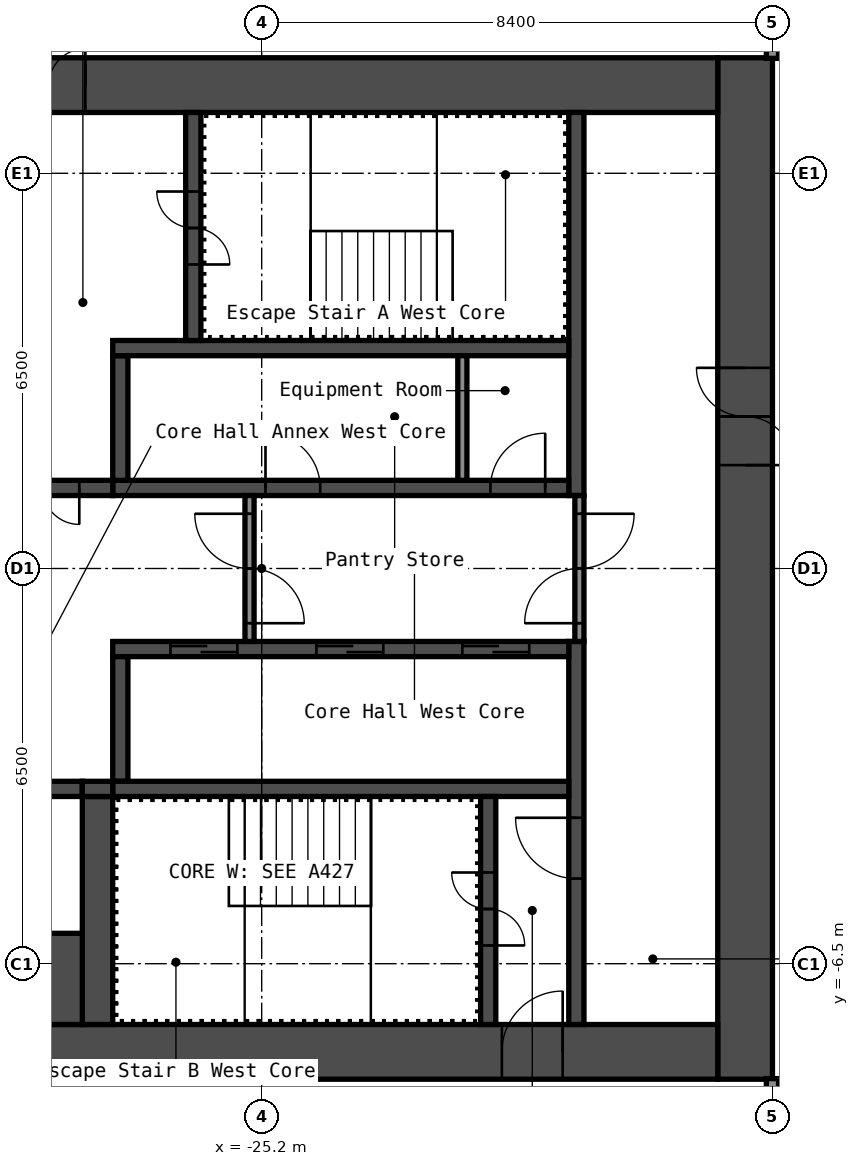
"""IFC4 building model, lengths in metres.
Left out: names, types, materials, properties, quantities, classifications, styles, units other than length and angle.
Written with IfcOpenShell. Run it as: python <this file> out.ifc"""

import sys

from ifc_helpers import new_model, si_unit, direction, frame, frame_2d, origin, place, context, subcontext, project, spatial, rectangle, extrude, element, fill, save


model = new_model("IFC4")
c1 = context("Model", 3, precision=1e-05, world=origin(), true_north=direction((0.0, 1.0)))
c2 = subcontext(c1, "Body", "Model", "MODEL_VIEW")
j1 = project(units=[si_unit("LENGTHUNIT", "METRE"), si_unit("PLANEANGLEUNIT", "RADIAN")], contexts=[c1])
p1 = place(None, origin())
s1 = spatial("IfcSite", under=j1, at=p1, CompositionType="ELEMENT")
p2 = place(p1, origin())
s2 = spatial("IfcBuilding", under=s1, at=p2, CompositionType="ELEMENT")
p3 = place(p2, frame((0.0, 0.0, 180.2)))
s3 = spatial("IfcBuildingStorey", under=s2, at=p3, CompositionType="ELEMENT", Elevation=180.2)
p4 = place(p3, frame((-17.25, -8.4, 0.0), z_axis=(0.0, 0.0, 1.0), x_axis=(0.0, 1.0, 0.0)))
e1 = element("IfcWall", 1, at=p4, inside=s3, PredefinedType="SHEAR", context=c2, shape_type="SweptSolid", body=[
    extrude(rectangle(XDim=16.8, YDim=0.9, at=frame_2d((8.4, 0.0))), origin(), (0.0, 0.0, 1.0), 5.95),
])
p5 = place(p4, frame((10.1, 0.0, 0.0)))
e2 = element("IfcOpeningElement", 2, at=p5, cuts=e1, PredefinedType="OPENING", context=c2, shape_type="SweptSolid", body=[
    extrude(rectangle(XDim=1.6, YDim=2.1, at=frame_2d((0.8, 1.05))), frame((0.0, 0.46, 0.0), z_axis=(0.0, -1.0, 0.0), x_axis=(1.0, 0.0, 0.0)), (0.0, 0.0, 1.0), 0.92),
])
p6 = place(p3, frame((-32.7, 7.95, 0.0), z_axis=(0.0, 0.0, 1.0), x_axis=(1.0, 0.0, 0.0)))
e3 = element("IfcWall", 3, at=p6, inside=s3, PredefinedType="SHEAR", context=c2, shape_type="SweptSolid", body=[
    extrude(rectangle(XDim=15.0, YDim=0.9, at=frame_2d((7.5, 0.0))), origin(), (0.0, 0.0, 1.0), 5.95),
])
p7 = place(p6, frame((3.4, 0.0, 0.0)))
e4 = element("IfcOpeningElement", 4, at=p7, cuts=e3, PredefinedType="OPENING", context=c2, shape_type="SweptSolid", body=[
    extrude(rectangle(XDim=1.2, YDim=2.1, at=frame_2d((0.6, 1.05))), frame((0.0, 0.46, 0.0), z_axis=(0.0, -1.0, 0.0), x_axis=(1.0, 0.0, 0.0)), (0.0, 0.0, 1.0), 0.92),
])
p8 = place(p6, frame((0.75, 0.0, 0.0)))
e5 = element("IfcOpeningElement", 5, at=p8, cuts=e3, PredefinedType="OPENING", context=c2, shape_type="SweptSolid", body=[
    extrude(rectangle(XDim=0.9, YDim=2.1, at=frame_2d((0.45, 1.05))), frame((0.0, 0.46, 0.0), z_axis=(0.0, -1.0, 0.0), x_axis=(1.0, 0.0, 0.0)), (0.0, 0.0, 1.0), 0.92),
])
p9 = place(p3, frame((-32.7, -7.95, 0.0), z_axis=(0.0, 0.0, 1.0), x_axis=(1.0, 0.0, 0.0)))
e6 = element("IfcWall", 6, at=p9, inside=s3, PredefinedType="SHEAR", context=c2, shape_type="SweptSolid", body=[
    extrude(rectangle(XDim=15.0, YDim=0.9, at=frame_2d((7.5, 0.0))), origin(), (0.0, 0.0, 1.0), 5.95),
])
p10 = place(p9, frame((11.45, 0.0, 0.0)))
e7 = element("IfcOpeningElement", 7, at=p10, cuts=e6, PredefinedType="OPENING", context=c2, shape_type="SweptSolid", body=[
    extrude(rectangle(XDim=1.0, YDim=2.1, at=frame_2d((0.5, 1.05))), frame((0.0, 0.46, 0.0), z_axis=(0.0, -1.0, 0.0), x_axis=(1.0, 0.0, 0.0)), (0.0, 0.0, 1.0), 0.92),
])
p11 = place(p3, frame((-20.025, 1.2, 0.0), z_axis=(0.0, 0.0, 1.0), x_axis=(0.0, 1.0, 0.0)))
e8 = element("IfcWall", 8, at=p11, inside=s3, PredefinedType="SHEAR", context=c2, shape_type="SweptSolid", body=[
    extrude(rectangle(XDim=6.3, YDim=0.25, at=frame_2d((3.15, 0.0))), origin(), (0.0, 0.0, 1.0), 5.95),
])
p12 = place(p3, frame((-20.025, -7.5, 0.0), z_axis=(0.0, 0.0, 1.0), x_axis=(0.0, 1.0, 0.0)))
e9 = element("IfcWall", 9, at=p12, inside=s3, PredefinedType="SHEAR", context=c2, shape_type="SweptSolid", body=[
    extrude(rectangle(XDim=6.3, YDim=0.25, at=frame_2d((3.15, 0.0))), origin(), (0.0, 0.0, 1.0), 5.95),
])
p13 = place(p12, frame((2.4, 0.0, 0.0)))
e10 = element("IfcOpeningElement", 10, at=p13, cuts=e9, PredefinedType="OPENING", context=c2, shape_type="SweptSolid", body=[
    extrude(rectangle(XDim=1.0, YDim=2.1, at=frame_2d((0.5, 1.05))), frame((0.0, 0.135, 0.0), z_axis=(0.0, -1.0, 0.0), x_axis=(1.0, 0.0, 0.0)), (0.0, 0.0, 1.0), 0.27),
])
p14 = place(p3, frame((-27.65, 1.325, 0.0), z_axis=(0.0, 0.0, 1.0), x_axis=(1.0, 0.0, 0.0)))
e11 = element("IfcWall", 11, at=p14, inside=s3, PredefinedType="SHEAR", context=c2, shape_type="SweptSolid", body=[
    extrude(rectangle(XDim=7.5, YDim=0.25, at=frame_2d((3.75, 0.0))), origin(), (0.0, 0.0, 1.0), 5.95),
])
p15 = place(p14, frame((6.212, 0.0, 0.0)))
e12 = element("IfcOpeningElement", 12, at=p15, cuts=e11, PredefinedType="OPENING", context=c2, shape_type="SweptSolid", body=[
    extrude(rectangle(XDim=0.9, YDim=2.1, at=frame_2d((0.45, 1.05))), frame((0.0, 0.135, 0.0), z_axis=(0.0, -1.0, 0.0), x_axis=(1.0, 0.0, 0.0)), (0.0, 0.0, 1.0), 0.27),
])
p16 = place(p14, frame((2.512, 0.0, 0.0)))
e13 = element("IfcOpeningElement", 13, at=p16, cuts=e11, PredefinedType="OPENING", context=c2, shape_type="SweptSolid", body=[
    extrude(rectangle(XDim=0.9, YDim=2.1, at=frame_2d((0.45, 1.05))), frame((0.0, 0.135, 0.0), z_axis=(0.0, -1.0, 0.0), x_axis=(1.0, 0.0, 0.0)), (0.0, 0.0, 1.0), 0.27),
])
p17 = place(p3, frame((-27.525, 1.45, 0.0), z_axis=(0.0, 0.0, 1.0), x_axis=(0.0, 1.0, 0.0)))
e14 = element("IfcWall", 14, at=p17, inside=s3, PredefinedType="SHEAR", context=c2, shape_type="SweptSolid", body=[
    extrude(rectangle(XDim=2.05, YDim=0.25, at=frame_2d((1.025, 0.0))), origin(), (0.0, 0.0, 1.0), 5.95),
])
p18 = place(p3, frame((-27.65, 3.625, 0.0), z_axis=(0.0, 0.0, 1.0), x_axis=(1.0, 0.0, 0.0)))
e15 = element("IfcWall", 15, at=p18, inside=s3, PredefinedType="SHEAR", context=c2, shape_type="SweptSolid", body=[
    extrude(rectangle(XDim=7.5, YDim=0.25, at=frame_2d((3.75, 0.0))), origin(), (0.0, 0.0, 1.0), 5.95),
])
p19 = place(p3, frame((-26.325, 3.75, 0.0), z_axis=(0.0, 0.0, 1.0), x_axis=(0.0, 1.0, 0.0)))
e16 = element("IfcWall", 16, at=p19, inside=s3, PredefinedType="SHEAR", context=c2, shape_type="SweptSolid", body=[
    extrude(rectangle(XDim=3.75, YDim=0.25, at=frame_2d((1.875, 0.0))), origin(), (0.0, 0.0, 1.0), 5.95),
])
p20 = place(p19, frame((1.25, 0.0, 0.0)))
e17 = element("IfcOpeningElement", 17, at=p20, cuts=e16, PredefinedType="OPENING", context=c2, shape_type="SweptSolid", body=[
    extrude(rectangle(XDim=1.2, YDim=2.1, at=frame_2d((0.6, 1.05))), frame((0.0, 0.135, 0.0), z_axis=(0.0, -1.0, 0.0), x_axis=(1.0, 0.0, 0.0)), (0.0, 0.0, 1.0), 0.27),
])
p21 = place(p3, frame((-32.7, 1.325, 0.0), z_axis=(0.0, 0.0, 1.0), x_axis=(1.0, 0.0, 0.0)))
e18 = element("IfcWall", 18, at=p21, inside=s3, PredefinedType="SHEAR", context=c2, shape_type="SweptSolid", body=[
    extrude(rectangle(XDim=5.05, YDim=0.25, at=frame_2d((2.525, 0.0))), origin(), (0.0, 0.0, 1.0), 5.95),
])
p22 = place(p21, frame((3.3, 0.0, 0.0)))
e19 = element("IfcOpeningElement", 19, at=p22, cuts=e18, PredefinedType="OPENING", context=c2, shape_type="SweptSolid", body=[
    extrude(rectangle(XDim=1.2, YDim=2.1, at=frame_2d((0.6, 1.05))), frame((0.0, 0.135, 0.0), z_axis=(0.0, -1.0, 0.0), x_axis=(1.0, 0.0, 0.0)), (0.0, 0.0, 1.0), 0.27),
])
p23 = place(p3, frame((-27.65, -1.325, 0.0), z_axis=(0.0, 0.0, 1.0), x_axis=(1.0, 0.0, 0.0)))
e20 = element("IfcWall", 20, at=p23, inside=s3, PredefinedType="SHEAR", context=c2, shape_type="SweptSolid", body=[
    extrude(rectangle(XDim=7.5, YDim=0.25, at=frame_2d((3.75, 0.0))), origin(), (0.0, 0.0, 1.0), 5.95),
])
p24 = place(p23, frame((5.75, 0.0, 0.0)))
e21 = element("IfcOpeningElement", 21, at=p24, cuts=e20, PredefinedType="OPENING", context=c2, shape_type="SweptSolid", body=[
    extrude(rectangle(XDim=1.1, YDim=2.1, at=frame_2d((0.55, 1.05))), frame((0.0, 0.135, 0.0), z_axis=(0.0, -1.0, 0.0), x_axis=(1.0, 0.0, 0.0)), (0.0, 0.0, 1.0), 0.27),
])
p25 = place(p23, frame((3.35, 0.0, 0.0)))
e22 = element("IfcOpeningElement", 22, at=p25, cuts=e20, PredefinedType="OPENING", context=c2, shape_type="SweptSolid", body=[
    extrude(rectangle(XDim=1.1, YDim=2.1, at=frame_2d((0.55, 1.05))), frame((0.0, 0.135, 0.0), z_axis=(0.0, -1.0, 0.0), x_axis=(1.0, 0.0, 0.0)), (0.0, 0.0, 1.0), 0.27),
])
p26 = place(p23, frame((0.95, 0.0, 0.0)))
e23 = element("IfcOpeningElement", 23, at=p26, cuts=e20, PredefinedType="OPENING", context=c2, shape_type="SweptSolid", body=[
    extrude(rectangle(XDim=1.1, YDim=2.1, at=frame_2d((0.55, 1.05))), frame((0.0, 0.135, 0.0), z_axis=(0.0, -1.0, 0.0), x_axis=(1.0, 0.0, 0.0)), (0.0, 0.0, 1.0), 0.27),
])
p27 = place(p3, frame((-27.525, -3.5, 0.0), z_axis=(0.0, 0.0, 1.0), x_axis=(0.0, 1.0, 0.0)))
e24 = element("IfcWall", 24, at=p27, inside=s3, PredefinedType="SHEAR", context=c2, shape_type="SweptSolid", body=[
    extrude(rectangle(XDim=2.05, YDim=0.25, at=frame_2d((1.025, 0.0))), origin(), (0.0, 0.0, 1.0), 5.95),
])
p28 = place(p3, frame((-27.65, -3.625, 0.0), z_axis=(0.0, 0.0, 1.0), x_axis=(1.0, 0.0, 0.0)))
e25 = element("IfcWall", 25, at=p28, inside=s3, PredefinedType="SHEAR", context=c2, shape_type="SweptSolid", body=[
    extrude(rectangle(XDim=7.5, YDim=0.25, at=frame_2d((3.75, 0.0))), origin(), (0.0, 0.0, 1.0), 5.95),
])
p29 = place(p3, frame((-21.475, -7.5, 0.0), z_axis=(0.0, 0.0, 1.0), x_axis=(0.0, 1.0, 0.0)))
e26 = element("IfcWall", 26, at=p29, inside=s3, PredefinedType="SHEAR", context=c2, shape_type="SweptSolid", body=[
    extrude(rectangle(XDim=3.75, YDim=0.25, at=frame_2d((1.875, 0.0))), origin(), (0.0, 0.0, 1.0), 5.95),
])
p30 = place(p29, frame((1.3, 0.0, 0.0)))
e27 = element("IfcOpeningElement", 27, at=p30, cuts=e26, PredefinedType="OPENING", context=c2, shape_type="SweptSolid", body=[
    extrude(rectangle(XDim=1.2, YDim=2.1, at=frame_2d((0.6, 1.05))), frame((0.0, 0.135, 0.0), z_axis=(0.0, -1.0, 0.0), x_axis=(1.0, 0.0, 0.0)), (0.0, 0.0, 1.0), 0.27),
])
p31 = place(p3, frame((-27.9, -7.5, 0.0), z_axis=(0.0, 0.0, 1.0), x_axis=(0.0, 1.0, 0.0)))
e28 = element("IfcWall", 28, at=p31, inside=s3, PredefinedType="SHEAR", context=c2, shape_type="SweptSolid", body=[
    extrude(rectangle(XDim=3.75, YDim=0.5, at=frame_2d((1.875, 0.0))), origin(), (0.0, 0.0, 1.0), 5.95),
])
p32 = place(p3, frame((-32.7, -3.625, 0.0), z_axis=(0.0, 0.0, 1.0), x_axis=(1.0, 0.0, 0.0)))
e29 = element("IfcWall", 29, at=p32, inside=s3, PredefinedType="SHEAR", context=c2, shape_type="SweptSolid", body=[
    extrude(rectangle(XDim=4.55, YDim=0.25, at=frame_2d((2.275, 0.0))), origin(), (0.0, 0.0, 1.0), 5.95),
])
p33 = place(p32, frame((2.85, 0.0, 0.0)))
e30 = element("IfcOpeningElement", 30, at=p33, cuts=e29, PredefinedType="OPENING", context=c2, shape_type="SweptSolid", body=[
    extrude(rectangle(XDim=1.1, YDim=2.1, at=frame_2d((0.55, 1.05))), frame((0.0, 0.135, 0.0), z_axis=(0.0, -1.0, 0.0), x_axis=(1.0, 0.0, 0.0)), (0.0, 0.0, 1.0), 0.27),
])
p34 = place(p32, frame((0.6, 0.0, 0.0)))
e31 = element("IfcOpeningElement", 31, at=p34, cuts=e29, PredefinedType="OPENING", context=c2, shape_type="SweptSolid", body=[
    extrude(rectangle(XDim=1.1, YDim=2.1, at=frame_2d((0.55, 1.05))), frame((0.0, 0.135, 0.0), z_axis=(0.0, -1.0, 0.0), x_axis=(1.0, 0.0, 0.0)), (0.0, 0.0, 1.0), 0.27),
])
p35 = place(p3, frame((-32.7, -6.75, 0.0), z_axis=(0.0, 0.0, 1.0), x_axis=(1.0, 0.0, 0.0)))
e32 = element("IfcWall", 32, at=p35, inside=s3, PredefinedType="SHEAR", context=c2, shape_type="SweptSolid", body=[
    extrude(rectangle(XDim=4.55, YDim=1.5, at=frame_2d((2.275, 0.0))), origin(), (0.0, 0.0, 1.0), 5.95),
])
p36 = place(p3, frame((-28.15, -3.625, 0.0), z_axis=(0.0, 0.0, 1.0), x_axis=(1.0, 0.0, 0.0)))
e33 = element("IfcWall", 33, at=p36, inside=s3, PredefinedType="SHEAR", context=c2, shape_type="SweptSolid", body=[
    extrude(rectangle(XDim=0.5, YDim=0.25, at=frame_2d((0.25, 0.0))), origin(), (0.0, 0.0, 1.0), 5.95),
])
p37 = place(p3, frame((-19.975, -1.2, 0.0), z_axis=(0.0, 0.0, 1.0), x_axis=(0.0, 1.0, 0.0)))
e34 = element("IfcWall", 34, at=p37, inside=s3, PredefinedType="PARTITIONING", context=c2, shape_type="SweptSolid", body=[
    extrude(rectangle(XDim=2.4, YDim=0.15, at=frame_2d((1.2, 0.0))), origin(), (0.0, 0.0, 1.0), 5.95),
])
p38 = place(p37, frame((0.3, 0.0, 0.0)))
e35 = element("IfcOpeningElement", 35, at=p38, cuts=e34, PredefinedType="OPENING", context=c2, shape_type="SweptSolid", body=[
    extrude(rectangle(XDim=1.8, YDim=2.1, at=frame_2d((0.9, 1.05))), frame((0.0, 0.085, 0.0), z_axis=(0.0, -1.0, 0.0), x_axis=(1.0, 0.0, 0.0)), (0.0, 0.0, 1.0), 0.17),
])
p39 = place(p3, frame((-25.4, -1.2, 0.0), z_axis=(0.0, 0.0, 1.0), x_axis=(0.0, 1.0, 0.0)))
e36 = element("IfcWall", 36, at=p39, inside=s3, PredefinedType="PARTITIONING", context=c2, shape_type="SweptSolid", body=[
    extrude(rectangle(XDim=2.4, YDim=0.15, at=frame_2d((1.2, 0.0))), origin(), (0.0, 0.0, 1.0), 5.95),
])
p40 = place(p39, frame((0.3, 0.0, 0.0)))
e37 = element("IfcOpeningElement", 37, at=p40, cuts=e36, PredefinedType="OPENING", context=c2, shape_type="SweptSolid", body=[
    extrude(rectangle(XDim=1.8, YDim=2.1, at=frame_2d((0.9, 1.05))), frame((0.0, 0.085, 0.0), z_axis=(0.0, -1.0, 0.0), x_axis=(1.0, 0.0, 0.0)), (0.0, 0.0, 1.0), 0.17),
])
p41 = place(p3, frame((-21.9, 1.45, 0.0), z_axis=(0.0, 0.0, 1.0), x_axis=(0.0, 1.0, 0.0)))
e38 = element("IfcWall", 38, at=p41, inside=s3, PredefinedType="PARTITIONING", context=c2, shape_type="SweptSolid", body=[
    extrude(rectangle(XDim=2.05, YDim=0.15, at=frame_2d((1.025, 0.0))), origin(), (0.0, 0.0, 1.0), 5.95),
])
p42 = place(p3, frame((-16.8, -15.55, 0.0), z_axis=(0.0, 0.0, 1.0), x_axis=(0.0, 1.0, 0.0)))
e39 = element("IfcWall", 39, at=p42, inside=s3, PredefinedType="PARTITIONING", context=c2, shape_type="SweptSolid", body=[
    extrude(rectangle(XDim=7.16, YDim=0.2, at=frame_2d((3.58, 0.0))), origin(), (0.0, 0.0, 1.0), 5.95),
])
p43 = place(p3, frame((-16.8, 8.39, 0.0), z_axis=(0.0, 0.0, 1.0), x_axis=(0.0, 1.0, 0.0)))
e40 = element("IfcWall", 40, at=p43, inside=s3, PredefinedType="PARTITIONING", context=c2, shape_type="SweptSolid", body=[
    extrude(rectangle(XDim=12.16, YDim=0.2, at=frame_2d((6.08, 0.0))), origin(), (0.0, 0.0, 1.0), 5.95),
])
p44 = place(p5, origin())
e41 = element("IfcDoor", 41, at=p44, inside=s3, OperationType="DOUBLE_DOOR_SINGLE_SWING", PredefinedType="DOOR", context=c2, shape_type="SweptSolid", body=[
    extrude(rectangle(XDim=1.6, YDim=2.1, at=frame_2d((0.8, 1.05))), frame((0.0, 0.025, 0.0), z_axis=(0.0, -1.0, 0.0), x_axis=(1.0, 0.0, 0.0)), (0.0, 0.0, 1.0), 0.05),
])
fill(e2, e41)
p45 = place(p7, origin())
e42 = element("IfcDoor", 42, at=p45, inside=s3, OperationType="DOUBLE_DOOR_SINGLE_SWING", PredefinedType="DOOR", context=c2, shape_type="SweptSolid", body=[
    extrude(rectangle(XDim=1.2, YDim=2.1, at=frame_2d((0.6, 1.05))), frame((0.0, 0.025, 0.0), z_axis=(0.0, -1.0, 0.0), x_axis=(1.0, 0.0, 0.0)), (0.0, 0.0, 1.0), 0.05),
])
fill(e4, e42)
p46 = place(p10, origin())
e43 = element("IfcDoor", 43, at=p46, inside=s3, OperationType="SINGLE_SWING_LEFT", PredefinedType="DOOR", context=c2, shape_type="SweptSolid", body=[
    extrude(rectangle(XDim=1.0, YDim=2.1, at=frame_2d((0.5, 1.05))), frame((0.0, 0.025, 0.0), z_axis=(0.0, -1.0, 0.0), x_axis=(1.0, 0.0, 0.0)), (0.0, 0.0, 1.0), 0.05),
])
fill(e7, e43)
p47 = place(p20, origin())
e44 = element("IfcDoor", 44, at=p47, inside=s3, OperationType="DOUBLE_DOOR_SINGLE_SWING", PredefinedType="DOOR", context=c2, shape_type="SweptSolid", body=[
    extrude(rectangle(XDim=1.2, YDim=2.1, at=frame_2d((0.6, 1.05))), frame((0.0, 0.025, 0.0), z_axis=(0.0, -1.0, 0.0), x_axis=(1.0, 0.0, 0.0)), (0.0, 0.0, 1.0), 0.05),
])
fill(e17, e44)
p48 = place(p30, origin())
e45 = element("IfcDoor", 45, at=p48, inside=s3, OperationType="DOUBLE_DOOR_SINGLE_SWING", PredefinedType="DOOR", context=c2, shape_type="SweptSolid", body=[
    extrude(rectangle(XDim=1.2, YDim=2.1, at=frame_2d((0.6, 1.05))), frame((0.0, 0.025, 0.0), z_axis=(0.0, -1.0, 0.0), x_axis=(1.0, 0.0, 0.0)), (0.0, 0.0, 1.0), 0.05),
])
fill(e27, e45)
p49 = place(p13, origin())
e46 = element("IfcDoor", 46, at=p49, inside=s3, OperationType="SINGLE_SWING_LEFT", PredefinedType="DOOR", context=c2, shape_type="SweptSolid", body=[
    extrude(rectangle(XDim=1.0, YDim=2.1, at=frame_2d((0.5, 1.05))), frame((0.0, 0.025, 0.0), z_axis=(0.0, -1.0, 0.0), x_axis=(1.0, 0.0, 0.0)), (0.0, 0.0, 1.0), 0.05),
])
fill(e10, e46)
p50 = place(p22, origin())
e47 = element("IfcDoor", 47, at=p50, inside=s3, OperationType="DOUBLE_DOOR_SINGLE_SWING", PredefinedType="DOOR", context=c2, shape_type="SweptSolid", body=[
    extrude(rectangle(XDim=1.2, YDim=2.1, at=frame_2d((0.6, 1.05))), frame((0.0, 0.025, 0.0), z_axis=(0.0, -1.0, 0.0), x_axis=(1.0, 0.0, 0.0)), (0.0, 0.0, 1.0), 0.05),
])
fill(e19, e47)
p51 = place(p38, origin())
e48 = element("IfcDoor", 48, at=p51, inside=s3, OperationType="DOUBLE_DOOR_SINGLE_SWING", PredefinedType="DOOR", context=c2, shape_type="SweptSolid", body=[
    extrude(rectangle(XDim=1.8, YDim=2.1, at=frame_2d((0.9, 1.05))), frame((0.0, 0.025, 0.0), z_axis=(0.0, -1.0, 0.0), x_axis=(1.0, 0.0, 0.0)), (0.0, 0.0, 1.0), 0.05),
])
fill(e35, e48)
p52 = place(p40, origin())
e49 = element("IfcDoor", 49, at=p52, inside=s3, OperationType="DOUBLE_DOOR_SINGLE_SWING", PredefinedType="DOOR", context=c2, shape_type="SweptSolid", body=[
    extrude(rectangle(XDim=1.8, YDim=2.1, at=frame_2d((0.9, 1.05))), frame((0.0, 0.025, 0.0), z_axis=(0.0, -1.0, 0.0), x_axis=(1.0, 0.0, 0.0)), (0.0, 0.0, 1.0), 0.05),
])
fill(e37, e49)
p53 = place(p15, origin())
e50 = element("IfcDoor", 50, at=p53, inside=s3, OperationType="SINGLE_SWING_LEFT", PredefinedType="DOOR", context=c2, shape_type="SweptSolid", body=[
    extrude(rectangle(XDim=0.9, YDim=2.1, at=frame_2d((0.45, 1.05))), frame((0.0, 0.025, 0.0), z_axis=(0.0, -1.0, 0.0), x_axis=(1.0, 0.0, 0.0)), (0.0, 0.0, 1.0), 0.05),
])
fill(e12, e50)
p54 = place(p16, origin())
e51 = element("IfcDoor", 51, at=p54, inside=s3, OperationType="SINGLE_SWING_RIGHT", PredefinedType="DOOR", context=c2, shape_type="SweptSolid", body=[
    extrude(rectangle(XDim=0.9, YDim=2.1, at=frame_2d((0.45, 1.05))), frame((0.0, 0.025, 0.0), z_axis=(0.0, -1.0, 0.0), x_axis=(1.0, 0.0, 0.0)), (0.0, 0.0, 1.0), 0.05),
])
fill(e13, e51)
p55 = place(p24, origin())
e52 = element("IfcDoor", 52, at=p55, inside=s3, OperationType="DOUBLE_DOOR_SLIDING", PredefinedType="DOOR", context=c2, shape_type="SweptSolid", body=[
    extrude(rectangle(XDim=1.1, YDim=2.1, at=frame_2d((0.55, 1.05))), frame((0.0, 0.025, 0.0), z_axis=(0.0, -1.0, 0.0), x_axis=(1.0, 0.0, 0.0)), (0.0, 0.0, 1.0), 0.05),
])
fill(e21, e52)
p56 = place(p25, origin())
e53 = element("IfcDoor", 53, at=p56, inside=s3, OperationType="DOUBLE_DOOR_SLIDING", PredefinedType="DOOR", context=c2, shape_type="SweptSolid", body=[
    extrude(rectangle(XDim=1.1, YDim=2.1, at=frame_2d((0.55, 1.05))), frame((0.0, 0.025, 0.0), z_axis=(0.0, -1.0, 0.0), x_axis=(1.0, 0.0, 0.0)), (0.0, 0.0, 1.0), 0.05),
])
fill(e22, e53)
p57 = place(p26, origin())
e54 = element("IfcDoor", 54, at=p57, inside=s3, OperationType="DOUBLE_DOOR_SLIDING", PredefinedType="DOOR", context=c2, shape_type="SweptSolid", body=[
    extrude(rectangle(XDim=1.1, YDim=2.1, at=frame_2d((0.55, 1.05))), frame((0.0, 0.025, 0.0), z_axis=(0.0, -1.0, 0.0), x_axis=(1.0, 0.0, 0.0)), (0.0, 0.0, 1.0), 0.05),
])
fill(e23, e54)
save(model, sys.argv[1])
